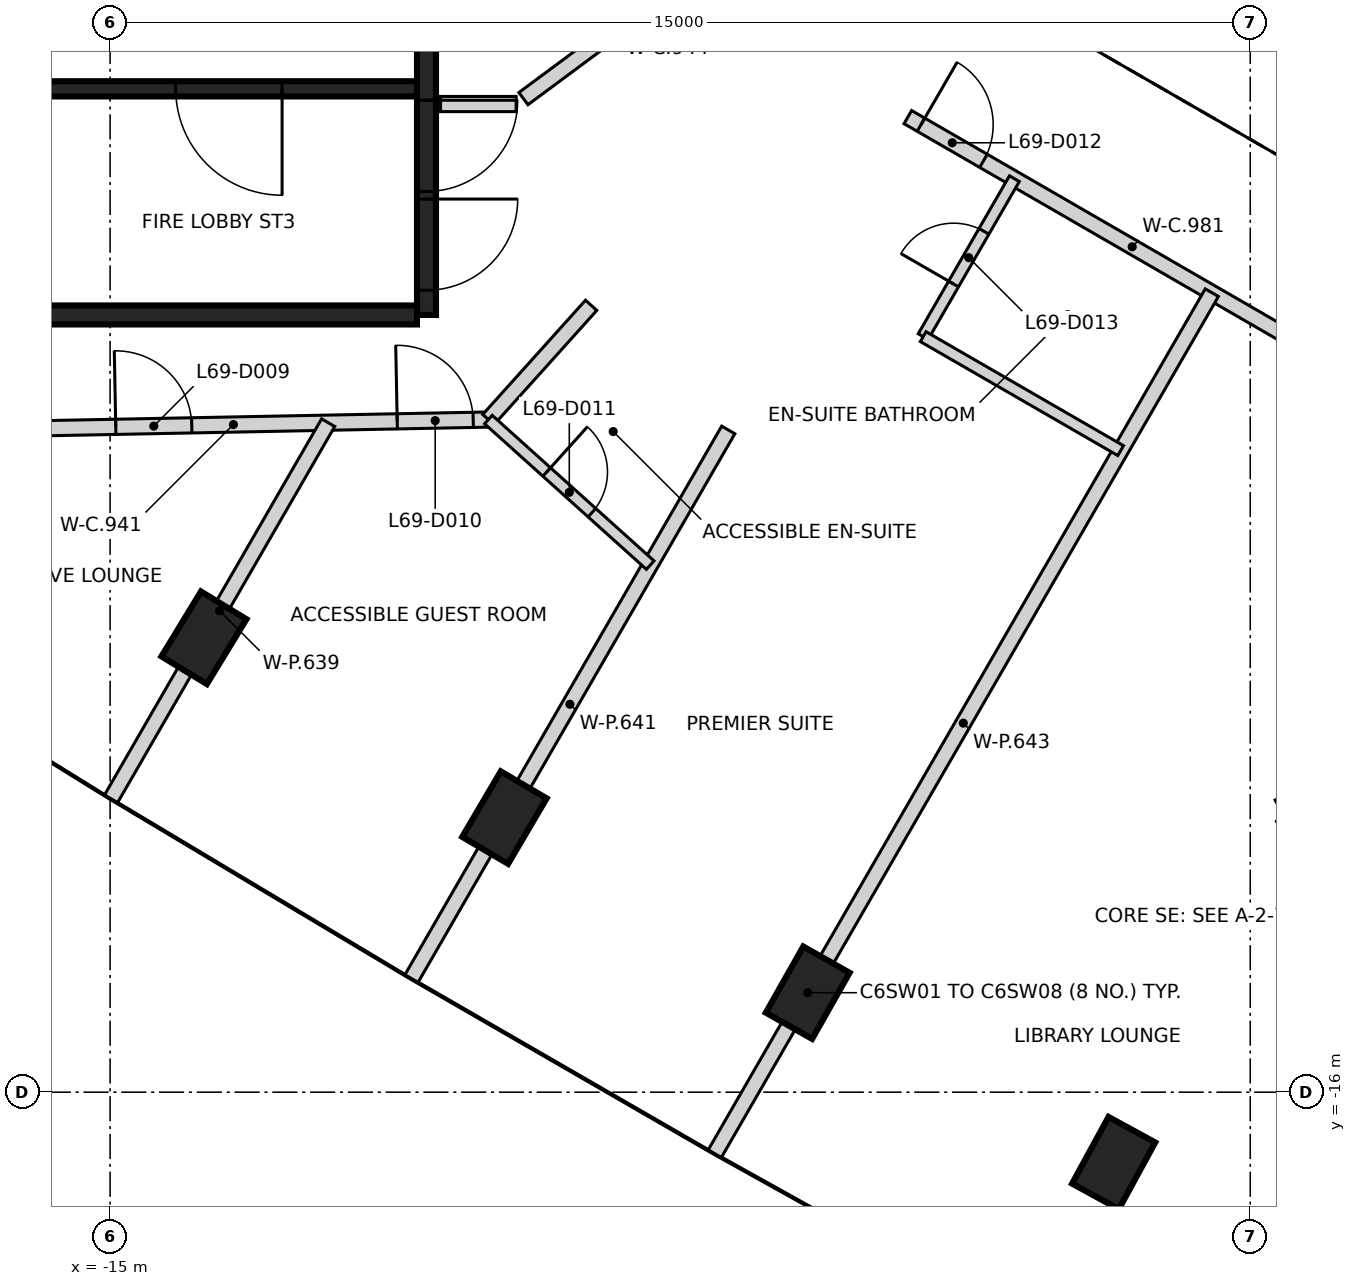
"""IFC4 building model, lengths in metres.
Left out: names, types, materials, properties, quantities, classifications, styles, units other than length and angle.
Written with IfcOpenShell. Run it as: python <this file> out.ifc"""

import sys

from ifc_helpers import new_model, si_unit, direction, frame, frame_2d, origin, origin_2d, place, context, subcontext, project, spatial, rectangle, extrude, element, fill, save


model = new_model("IFC4")
c1 = context("Model", 3, precision=1e-05, world=origin(), true_north=direction((0.0, 1.0)))
c2 = subcontext(c1, "Body", "Model", "MODEL_VIEW")
j1 = project(units=[si_unit("LENGTHUNIT", "METRE"), si_unit("PLANEANGLEUNIT", "RADIAN")], contexts=[c1])
p1 = place(None, origin())
s1 = spatial("IfcSite", under=j1, at=p1, CompositionType="ELEMENT")
p2 = place(p1, origin())
s2 = spatial("IfcBuilding", under=s1, at=p2, CompositionType="ELEMENT")
p3 = place(p2, frame((0.0, 0.0, 273.0)))
s3 = spatial("IfcBuildingStorey", under=s2, at=p3, CompositionType="ELEMENT", Elevation=273.0)
for number, where, z_axis, x_axis in (
    (1, (-13.765, -10.022, -0.35), (0.0, 0.0, 1.0), (0.52, 0.854, 0.0)),
    (2, (-9.812, -12.388, -0.35), (0.0, 0.0, 1.0), (0.507, 0.862, 0.0)),
    (3, (-5.822, -14.691, -0.35), (0.0, 0.0, 1.0), (0.493, 0.87, 0.0)),
    (4, (-1.797, -16.932, -0.35), (0.0, 0.0, 1.0), (0.479, 0.878, 0.0)),
):
    element("IfcColumn", number, at=place(p3, frame(where, z_axis=z_axis, x_axis=x_axis)), inside=s3, PredefinedType="COLUMN", context=c2, shape_type="SweptSolid", body=[
        extrude(rectangle(XDim=1.0, YDim=0.7, at=origin_2d()), origin(), (0.0, 0.0, 1.0), 3.6),
    ])
p4 = place(p3, frame((-10.837, 5.775, 0.0), z_axis=(0.0, 0.0, 1.0), x_axis=(0.0, -1.0, 0.0)))
e5 = element("IfcWall", 5, at=p4, inside=s3, PredefinedType="SHEAR", context=c2, shape_type="SweptSolid", body=[
    extrude(rectangle(XDim=11.55, YDim=0.25, at=frame_2d((5.775, 0.0))), origin(), (0.0, 0.0, 1.0), 3.25),
])
p5 = place(p4, frame((10.025, 0.0, 0.0)))
e6 = element("IfcOpeningElement", 6, at=p5, cuts=e5, PredefinedType="OPENING", context=c2, shape_type="SweptSolid", body=[
    extrude(rectangle(XDim=1.2, YDim=2.1, at=frame_2d((0.6, 1.05))), frame((0.0, 0.135, 0.0), z_axis=(0.0, -1.0, 0.0), x_axis=(1.0, 0.0, 0.0)), (0.0, 0.0, 1.0), 0.27),
])
p6 = place(p4, frame((8.725, 0.0, 0.0)))
e7 = element("IfcOpeningElement", 7, at=p6, cuts=e5, PredefinedType="OPENING", context=c2, shape_type="SweptSolid", body=[
    extrude(rectangle(XDim=1.2, YDim=2.1, at=frame_2d((0.6, 1.05))), frame((0.0, 0.135, 0.0), z_axis=(0.0, -1.0, 0.0), x_axis=(1.0, 0.0, 0.0)), (0.0, 0.0, 1.0), 0.27),
])
p7 = place(p3, frame((-10.963, -5.775, 0.0), z_axis=(0.0, 0.0, 1.0), x_axis=(-1.0, 0.0, 0.0)))
e8 = element("IfcWall", 8, at=p7, inside=s3, PredefinedType="SHEAR", context=c2, shape_type="SweptSolid", body=[
    extrude(rectangle(XDim=5.225, YDim=0.25, at=frame_2d((2.612, 0.0))), origin(), (0.0, 0.0, 1.0), 3.25),
])
p8 = place(p3, frame((-10.963, -2.8, 0.0), z_axis=(0.0, 0.0, 1.0), x_axis=(-1.0, 0.0, 0.0)))
e9 = element("IfcWall", 9, at=p8, inside=s3, PredefinedType="SHEAR", context=c2, shape_type="SweptSolid", body=[
    extrude(rectangle(XDim=5.098, YDim=0.2, at=frame_2d((2.549, 0.0))), origin(), (0.0, 0.0, 1.0), 3.25),
])
p9 = place(p8, frame((1.774, 0.0, 0.0)))
e10 = element("IfcOpeningElement", 10, at=p9, cuts=e9, PredefinedType="OPENING", context=c2, shape_type="SweptSolid", body=[
    extrude(rectangle(XDim=1.4, YDim=2.1, at=frame_2d((0.7, 1.05))), frame((0.0, 0.11, 0.0), z_axis=(0.0, -1.0, 0.0), x_axis=(1.0, 0.0, 0.0)), (0.0, 0.0, 1.0), 0.22),
])
p10 = place(p3, frame((0.417, -12.273, 0.0), z_axis=(0.0, 0.0, 1.0), x_axis=(0.866021906294, 0.500006057782, 0.0)))
e11 = element("IfcWall", 11, at=p10, inside=s3, PredefinedType="SHEAR", context=c2, shape_type="SweptSolid", body=[
    extrude(rectangle(XDim=11.55, YDim=0.25, at=frame_2d((5.775, 0.0))), origin(), (0.0, 0.0, 1.0), 3.25),
])
p11 = place(p10, frame((10.025, 0.0, 0.0)))
e12 = element("IfcOpeningElement", 12, at=p11, cuts=e11, PredefinedType="OPENING", context=c2, shape_type="SweptSolid", body=[
    extrude(rectangle(XDim=1.2, YDim=2.1, at=frame_2d((0.6, 1.05))), frame((0.0, 0.135, 0.0), z_axis=(0.0, -1.0, 0.0), x_axis=(1.0, 0.0, 0.0)), (0.0, 0.0, 1.0), 0.27),
])
p12 = place(p10, frame((8.725, 0.0, 0.0)))
e13 = element("IfcOpeningElement", 13, at=p12, cuts=e11, PredefinedType="OPENING", context=c2, shape_type="SweptSolid", body=[
    extrude(rectangle(XDim=1.2, YDim=2.1, at=frame_2d((0.6, 1.05))), frame((0.0, 0.135, 0.0), z_axis=(0.0, -1.0, 0.0), x_axis=(1.0, 0.0, 0.0)), (0.0, 0.0, 1.0), 0.27),
])
p13 = place(p3, frame((-16.732, -7.282, 0.0), z_axis=(0.0, 0.0, 1.0), x_axis=(0.999809829903, 0.019501385329, 0.0)))
e14 = element("IfcWall", 14, at=p13, inside=s3, PredefinedType="PARTITIONING", context=c2, shape_type="SweptSolid", body=[
    extrude(rectangle(XDim=6.71, YDim=0.2, at=frame_2d((3.355, 0.0))), origin(), (0.0, 0.0, 1.0), 3.25),
])
p14 = place(p13, frame((1.807, 0.0, 0.0)))
e15 = element("IfcOpeningElement", 15, at=p14, cuts=e14, PredefinedType="OPENING", context=c2, shape_type="SweptSolid", body=[
    extrude(rectangle(XDim=1.0, YDim=2.1, at=frame_2d((0.5, 1.05))), frame((0.0, 0.11, 0.0), z_axis=(0.0, -1.0, 0.0), x_axis=(1.0, 0.0, 0.0)), (0.0, 0.0, 1.0), 0.22),
])
p15 = place(p13, frame((5.51, 0.0, 0.0)))
e16 = element("IfcOpeningElement", 16, at=p15, cuts=e14, PredefinedType="OPENING", context=c2, shape_type="SweptSolid", body=[
    extrude(rectangle(XDim=1.0, YDim=2.1, at=frame_2d((0.5, 1.05))), frame((0.0, 0.11, 0.0), z_axis=(0.0, -1.0, 0.0), x_axis=(1.0, 0.0, 0.0)), (0.0, 0.0, 1.0), 0.22),
])
p16 = place(p3, frame((-10.652, -3.0, 0.0), z_axis=(0.0, 0.0, 1.0), x_axis=(1.0, 0.0, 0.0)))
e17 = element("IfcWall", 17, at=p16, inside=s3, PredefinedType="PARTITIONING", context=c2, shape_type="SweptSolid", body=[
    extrude(rectangle(XDim=0.994, YDim=0.2, at=frame_2d((0.497, 0.0))), origin(), (0.0, 0.0, 1.0), 3.25),
])
p17 = place(p3, frame((-10.023, -7.151, 0.0), z_axis=(0.0, 0.0, 1.0), x_axis=(0.668804583793, 0.743438248073, 0.0)))
e18 = element("IfcWall", 18, at=p17, inside=s3, PredefinedType="PARTITIONING", context=c2, shape_type="SweptSolid", body=[
    extrude(rectangle(XDim=2.021, YDim=0.2, at=frame_2d((1.011, 0.0))), origin(), (0.0, 0.0, 1.0), 3.25),
])
p18 = place(p3, frame((-7.115, -1.115, 0.0), z_axis=(0.0, 0.0, 1.0), x_axis=(-0.803344165632, -0.595515030495, 0.0)))
e19 = element("IfcWall", 19, at=p18, inside=s3, PredefinedType="PARTITIONING", context=c2, shape_type="SweptSolid", body=[
    extrude(rectangle(XDim=3.046, YDim=0.2, at=frame_2d((1.523, 0.0))), origin(), (0.0, 0.0, 1.0), 3.25),
])
p19 = place(p3, frame((-4.505, -3.172, 0.0), z_axis=(0.0, 0.0, 1.0), x_axis=(0.865815783666, -0.500362897061, 0.0)))
e20 = element("IfcWall", 20, at=p19, inside=s3, PredefinedType="PARTITIONING", context=c2, shape_type="SweptSolid", body=[
    extrude(rectangle(XDim=6.819, YDim=0.2, at=frame_2d((3.409, 0.0))), origin(), (0.0, 0.0, 1.0), 3.25),
])
p20 = place(p19, frame((0.2, 0.0, 0.0)))
e21 = element("IfcOpeningElement", 21, at=p20, cuts=e20, PredefinedType="OPENING", context=c2, shape_type="SweptSolid", body=[
    extrude(rectangle(XDim=0.95, YDim=2.1, at=frame_2d((0.475, 1.05))), frame((0.0, 0.11, 0.0), z_axis=(0.0, -1.0, 0.0), x_axis=(1.0, 0.0, 0.0)), (0.0, 0.0, 1.0), 0.22),
])
p21 = place(p3, frame((-14.987, -12.14, 0.0), z_axis=(0.0, 0.0, 1.0), x_axis=(0.499912336857, 0.866076010208, 0.0)))
e22 = element("IfcWall", 22, at=p21, inside=s3, PredefinedType="PARTITIONING", context=c2, shape_type="SweptSolid", body=[
    extrude(rectangle(XDim=5.713, YDim=0.2, at=frame_2d((2.857, 0.0))), origin(), (0.0, 0.0, 1.0), 3.25),
])
p22 = place(p3, frame((-11.035, -14.505, 0.0), z_axis=(0.0, 0.0, 1.0), x_axis=(0.50003941366, 0.866002647102, 0.0)))
e23 = element("IfcWall", 23, at=p22, inside=s3, PredefinedType="PARTITIONING", context=c2, shape_type="SweptSolid", body=[
    extrude(rectangle(XDim=8.334, YDim=0.2, at=frame_2d((4.167, 0.0))), origin(), (0.0, 0.0, 1.0), 3.25),
])
p23 = place(p3, frame((-7.044, -16.809, 0.0), z_axis=(0.0, 0.0, 1.0), x_axis=(0.499969679245, 0.866042908773, 0.0)))
e24 = element("IfcWall", 24, at=p23, inside=s3, PredefinedType="PARTITIONING", context=c2, shape_type="SweptSolid", body=[
    extrude(rectangle(XDim=13.079, YDim=0.2, at=frame_2d((6.54, 0.0))), origin(), (0.0, 0.0, 1.0), 3.25),
])
p24 = place(p3, frame((-10.023, -7.151, 0.0), z_axis=(0.0, 0.0, 1.0), x_axis=(0.743463699468, -0.668776291127, 0.0)))
e25 = element("IfcWall", 25, at=p24, inside=s3, PredefinedType="PARTITIONING", context=c2, shape_type="SweptSolid", body=[
    extrude(rectangle(XDim=2.864, YDim=0.15, at=frame_2d((1.432, 0.0))), origin(), (0.0, 0.0, 1.0), 3.25),
])
p25 = place(p24, frame((1.031, 0.0, 0.0)))
e26 = element("IfcOpeningElement", 26, at=p25, cuts=e25, PredefinedType="OPENING", context=c2, shape_type="SweptSolid", body=[
    extrude(rectangle(XDim=0.8, YDim=2.1, at=frame_2d((0.4, 1.05))), frame((0.0, 0.085, 0.0), z_axis=(0.0, -1.0, 0.0), x_axis=(1.0, 0.0, 0.0)), (0.0, 0.0, 1.0), 0.17),
])
p26 = place(p3, frame((-4.303, -6.06, 0.0), z_axis=(0.0, 0.0, 1.0), x_axis=(0.500045362686, 0.865999212041, 0.0)))
e27 = element("IfcWall", 27, at=p26, inside=s3, PredefinedType="PARTITIONING", context=c2, shape_type="SweptSolid", body=[
    extrude(rectangle(XDim=2.4, YDim=0.15, at=frame_2d((1.2, 0.0))), origin(), (0.0, 0.0, 1.0), 3.25),
])
p27 = place(p26, frame((0.8, 0.0, 0.0)))
e28 = element("IfcOpeningElement", 28, at=p27, cuts=e27, PredefinedType="OPENING", context=c2, shape_type="SweptSolid", body=[
    extrude(rectangle(XDim=0.8, YDim=2.1, at=frame_2d((0.4, 1.05))), frame((0.0, 0.085, 0.0), z_axis=(0.0, -1.0, 0.0), x_axis=(1.0, 0.0, 0.0)), (0.0, 0.0, 1.0), 0.17),
])
p28 = place(p3, frame((-4.303, -6.06, 0.0), z_axis=(0.0, 0.0, 1.0), x_axis=(0.866010750942, -0.50002537861, 0.0)))
e29 = element("IfcWall", 29, at=p28, inside=s3, PredefinedType="PARTITIONING", context=c2, shape_type="SweptSolid", body=[
    extrude(rectangle(XDim=3.0, YDim=0.15, at=frame_2d((1.5, 0.0))), origin(), (0.0, 0.0, 1.0), 3.25),
])
p29 = place(p5, origin())
e30 = element("IfcDoor", 30, at=p29, inside=s3, OperationType="SINGLE_SWING_LEFT", PredefinedType="DOOR", context=c2, shape_type="SweptSolid", body=[
    extrude(rectangle(XDim=1.2, YDim=2.1, at=frame_2d((0.6, 1.05))), frame((0.0, 0.025, 0.0), z_axis=(0.0, -1.0, 0.0), x_axis=(1.0, 0.0, 0.0)), (0.0, 0.0, 1.0), 0.05),
])
fill(e6, e30)
p30 = place(p6, origin())
e31 = element("IfcDoor", 31, at=p30, inside=s3, OperationType="SINGLE_SWING_RIGHT", PredefinedType="DOOR", context=c2, shape_type="SweptSolid", body=[
    extrude(rectangle(XDim=1.2, YDim=2.1, at=frame_2d((0.6, 1.05))), frame((0.0, 0.025, 0.0), z_axis=(0.0, -1.0, 0.0), x_axis=(1.0, 0.0, 0.0)), (0.0, 0.0, 1.0), 0.05),
])
fill(e7, e31)
p31 = place(p9, origin())
e32 = element("IfcDoor", 32, at=p31, inside=s3, OperationType="SINGLE_SWING_RIGHT", PredefinedType="DOOR", context=c2, shape_type="SweptSolid", body=[
    extrude(rectangle(XDim=1.4, YDim=2.1, at=frame_2d((0.7, 1.05))), frame((0.0, 0.025, 0.0), z_axis=(0.0, -1.0, 0.0), x_axis=(1.0, 0.0, 0.0)), (0.0, 0.0, 1.0), 0.05),
])
fill(e10, e32)
p32 = place(p14, origin())
e33 = element("IfcDoor", 33, at=p32, inside=s3, OperationType="SINGLE_SWING_LEFT", PredefinedType="DOOR", context=c2, shape_type="SweptSolid", body=[
    extrude(rectangle(XDim=1.0, YDim=2.1, at=frame_2d((0.5, 1.05))), frame((0.0, 0.025, 0.0), z_axis=(0.0, -1.0, 0.0), x_axis=(1.0, 0.0, 0.0)), (0.0, 0.0, 1.0), 0.05),
])
fill(e15, e33)
p33 = place(p15, frame((1.0, 0.0, 0.0), z_axis=(0.0, 0.0, 1.0), x_axis=(-1.0, 0.0, 0.0)))
e34 = element("IfcDoor", 34, at=p33, inside=s3, OperationType="SINGLE_SWING_LEFT", PredefinedType="DOOR", context=c2, shape_type="SweptSolid", body=[
    extrude(rectangle(XDim=1.0, YDim=2.1, at=frame_2d((0.5, 1.05))), frame((0.0, 0.025, 0.0), z_axis=(0.0, -1.0, 0.0), x_axis=(1.0, 0.0, 0.0)), (0.0, 0.0, 1.0), 0.05),
])
fill(e16, e34)
p34 = place(p25, frame((0.8, 0.0, 0.0), z_axis=(0.0, 0.0, 1.0), x_axis=(-1.0, 0.0, 0.0)))
e35 = element("IfcDoor", 35, at=p34, inside=s3, OperationType="SINGLE_SWING_LEFT", PredefinedType="DOOR", context=c2, shape_type="SweptSolid", body=[
    extrude(rectangle(XDim=0.8, YDim=2.1, at=frame_2d((0.4, 1.05))), frame((0.0, 0.025, 0.0), z_axis=(0.0, -1.0, 0.0), x_axis=(1.0, 0.0, 0.0)), (0.0, 0.0, 1.0), 0.05),
])
fill(e26, e35)
p35 = place(p20, frame((0.95, 0.0, 0.0), z_axis=(0.0, 0.0, 1.0), x_axis=(-1.0, 0.0, 0.0)))
e36 = element("IfcDoor", 36, at=p35, inside=s3, OperationType="SINGLE_SWING_LEFT", PredefinedType="DOOR", context=c2, shape_type="SweptSolid", body=[
    extrude(rectangle(XDim=0.95, YDim=2.1, at=frame_2d((0.475, 1.05))), frame((0.0, 0.025, 0.0), z_axis=(0.0, -1.0, 0.0), x_axis=(1.0, 0.0, 0.0)), (0.0, 0.0, 1.0), 0.05),
])
fill(e21, e36)
p36 = place(p27, frame((0.8, 0.0, 0.0), z_axis=(0.0, 0.0, 1.0), x_axis=(-1.0, 0.0, 0.0)))
e37 = element("IfcDoor", 37, at=p36, inside=s3, OperationType="SINGLE_SWING_LEFT", PredefinedType="DOOR", context=c2, shape_type="SweptSolid", body=[
    extrude(rectangle(XDim=0.8, YDim=2.1, at=frame_2d((0.4, 1.05))), frame((0.0, 0.025, 0.0), z_axis=(0.0, -1.0, 0.0), x_axis=(1.0, 0.0, 0.0)), (0.0, 0.0, 1.0), 0.05),
])
fill(e28, e37)
save(model, sys.argv[1])
